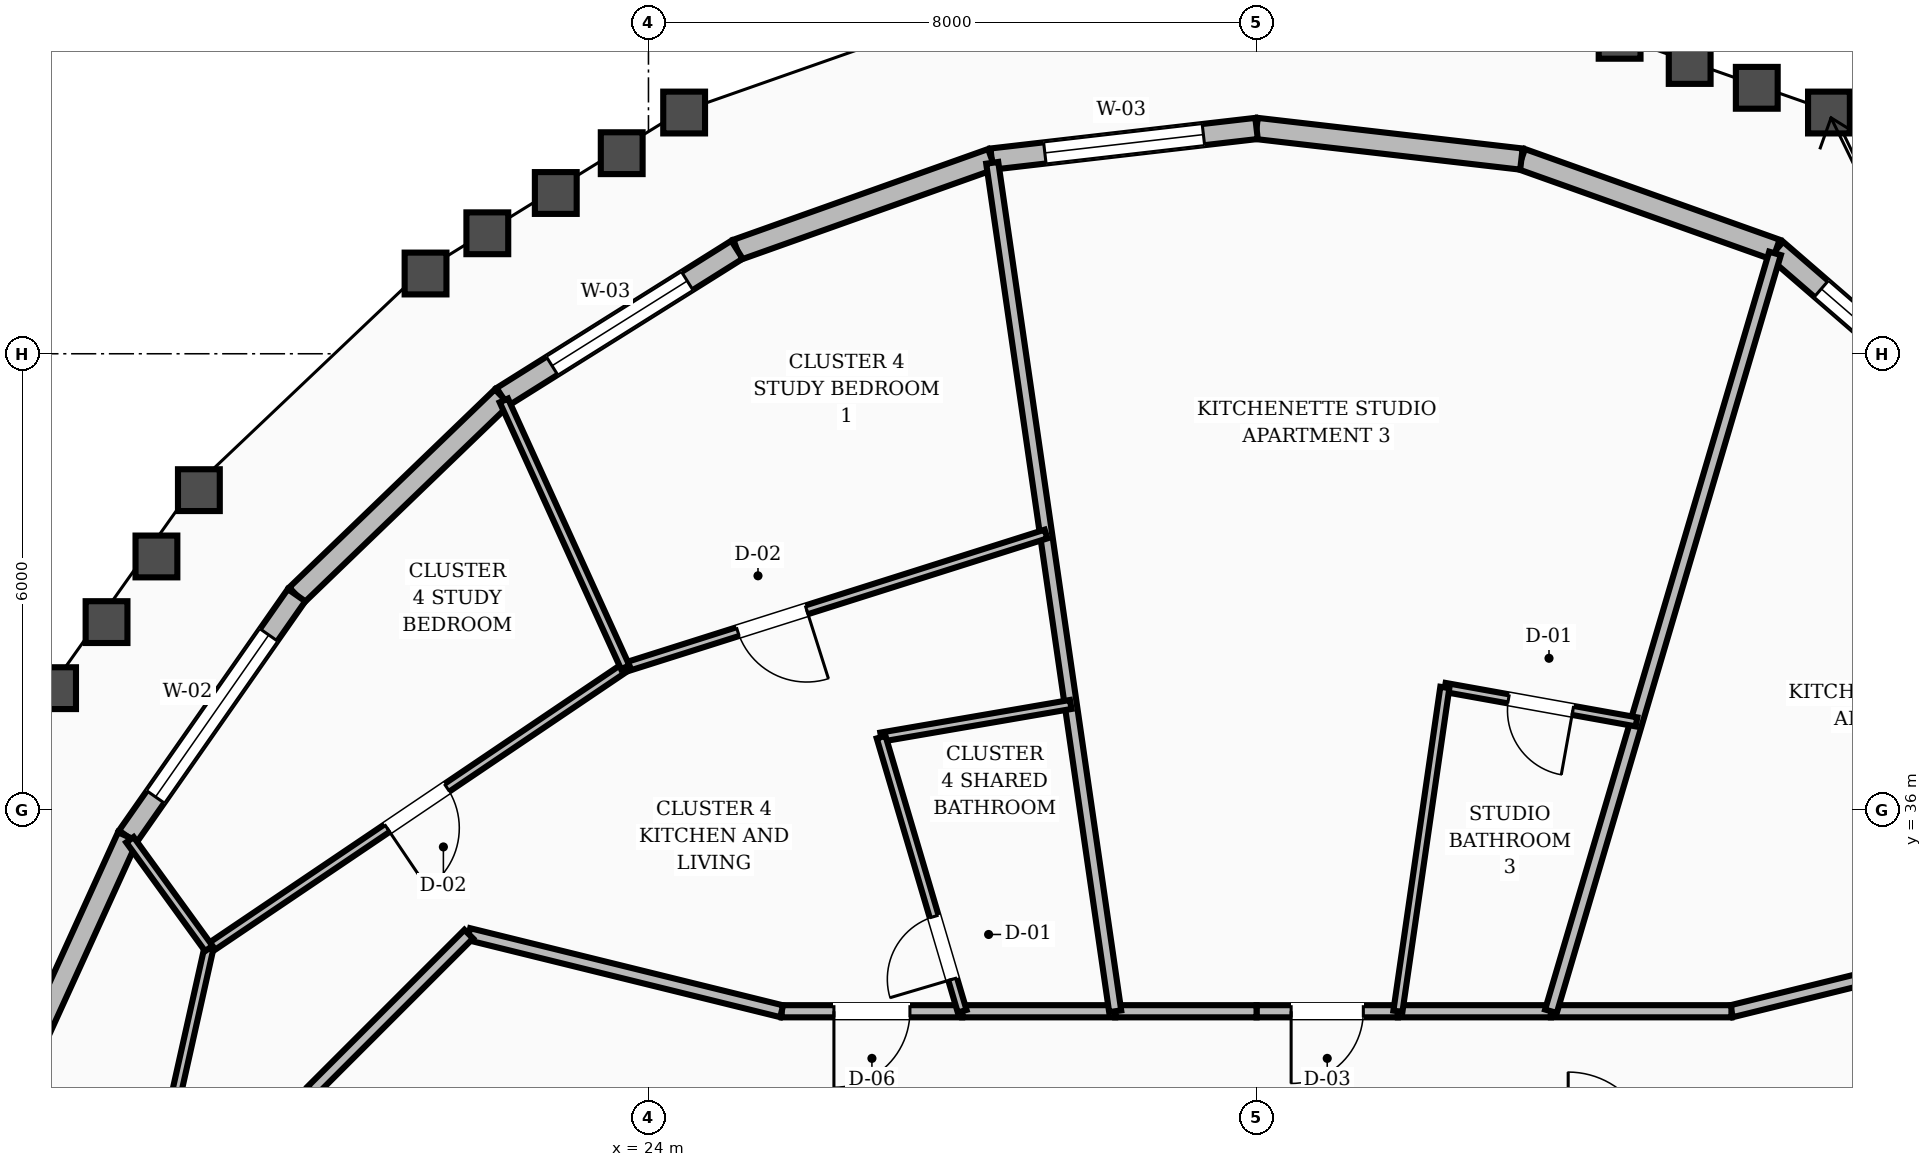
"""IFC4 building model, lengths in metres.
Left out: names, types, materials, properties, quantities, classifications, styles, units other than length and angle.
Written with IfcOpenShell. Run it as: python <this file> out.ifc"""

import sys

from ifc_helpers import new_model, si_unit, direction, frame, frame_2d, origin, place, context, subcontext, project, spatial, rectangle, extrude, element, fill, save


model = new_model("IFC4")
c1 = context("Model", 3, precision=1e-05, world=origin(), true_north=direction((0.0, 1.0)))
c2 = subcontext(c1, "Body", "Model", "MODEL_VIEW")
j1 = project(units=[si_unit("LENGTHUNIT", "METRE"), si_unit("PLANEANGLEUNIT", "RADIAN")], contexts=[c1])
p1 = place(None, origin())
s1 = spatial("IfcSite", under=j1, at=p1, CompositionType="ELEMENT")
p2 = place(p1, origin())
s2 = spatial("IfcBuilding", under=s1, at=p2, CompositionType="ELEMENT")
p3 = place(p2, frame((0.0, 0.0, 290.4)))
s3 = spatial("IfcBuildingStorey", under=s2, at=p3, CompositionType="ELEMENT", Elevation=290.4)
p4 = place(p3, frame((41.682, 40.905, 0.0), z_axis=(0.0, 0.0, 1.0), x_axis=(-0.756185346013, 0.654357488286, 0.0)))
e1 = element("IfcWall", 1, at=p4, inside=s3, PredefinedType="STANDARD", context=c2, shape_type="SweptSolid", body=[
    extrude(rectangle(XDim=3.764, YDim=0.28, at=frame_2d((1.882, 0.0))), origin(), (0.0, 0.0, 1.0), 2.88),
])
p5 = place(p4, frame((0.878, 0.0, 0.8)))
e2 = element("IfcOpeningElement", 2, at=p5, cuts=e1, PredefinedType="OPENING", context=c2, shape_type="SweptSolid", body=[
    extrude(rectangle(XDim=2.1, YDim=1.65, at=frame_2d((1.05, 0.825))), frame((0.0, 0.15, 0.0), z_axis=(0.0, -1.0, 0.0), x_axis=(1.0, 0.0, 0.0)), (0.0, 0.0, 1.0), 0.3),
])
p6 = place(p3, frame((38.835, 43.368, 0.0), z_axis=(0.0, 0.0, 1.0), x_axis=(-0.94207690039, 0.335396949527, 0.0)))
e3 = element("IfcWall", 3, at=p6, inside=s3, PredefinedType="STANDARD", context=c2, shape_type="SweptSolid", body=[
    extrude(rectangle(XDim=3.557, YDim=0.28, at=frame_2d((1.778, 0.0))), origin(), (0.0, 0.0, 1.0), 2.88),
])
p7 = place(p3, frame((35.485, 44.561, 0.0), z_axis=(0.0, 0.0, 1.0), x_axis=(-0.993384223019, 0.114838083653, 0.0)))
e4 = element("IfcWall", 4, at=p7, inside=s3, PredefinedType="STANDARD", context=c2, shape_type="SweptSolid", body=[
    extrude(rectangle(XDim=3.508, YDim=0.28, at=frame_2d((1.754, 0.0))), origin(), (0.0, 0.0, 1.0), 2.88),
])
p8 = place(p3, frame((32.0, 44.964, 0.0), z_axis=(0.0, 0.0, 1.0), x_axis=(-0.993384223019, -0.114838083653, 0.0)))
e5 = element("IfcWall", 5, at=p8, inside=s3, PredefinedType="STANDARD", context=c2, shape_type="SweptSolid", body=[
    extrude(rectangle(XDim=3.508, YDim=0.28, at=frame_2d((1.754, 0.0))), origin(), (0.0, 0.0, 1.0), 2.88),
])
p9 = place(p8, frame((0.704, 0.0, 0.8)))
e6 = element("IfcOpeningElement", 6, at=p9, cuts=e5, PredefinedType="OPENING", context=c2, shape_type="SweptSolid", body=[
    extrude(rectangle(XDim=2.1, YDim=1.65, at=frame_2d((1.05, 0.825))), frame((0.0, 0.15, 0.0), z_axis=(0.0, -1.0, 0.0), x_axis=(1.0, 0.0, 0.0)), (0.0, 0.0, 1.0), 0.3),
])
p10 = place(p3, frame((28.515, 44.561, 0.0), z_axis=(0.0, 0.0, 1.0), x_axis=(-0.94207690039, -0.335396949527, 0.0)))
e7 = element("IfcWall", 7, at=p10, inside=s3, PredefinedType="STANDARD", context=c2, shape_type="SweptSolid", body=[
    extrude(rectangle(XDim=3.557, YDim=0.28, at=frame_2d((1.778, 0.0))), origin(), (0.0, 0.0, 1.0), 2.88),
])
p11 = place(p3, frame((25.165, 43.368, 0.0), z_axis=(0.0, 0.0, 1.0), x_axis=(-0.847094045547, -0.531443014818, 0.0)))
e8 = element("IfcWall", 8, at=p11, inside=s3, PredefinedType="STANDARD", context=c2, shape_type="SweptSolid", body=[
    extrude(rectangle(XDim=3.645, YDim=0.28, at=frame_2d((1.823, 0.0))), origin(), (0.0, 0.0, 1.0), 2.88),
])
p12 = place(p11, frame((0.773, 0.0, 0.8)))
e9 = element("IfcOpeningElement", 9, at=p12, cuts=e8, PredefinedType="OPENING", context=c2, shape_type="SweptSolid", body=[
    extrude(rectangle(XDim=2.1, YDim=1.65, at=frame_2d((1.05, 0.825))), frame((0.0, 0.15, 0.0), z_axis=(0.0, -1.0, 0.0), x_axis=(1.0, 0.0, 0.0)), (0.0, 0.0, 1.0), 0.3),
])
p13 = place(p3, frame((22.077, 41.431, 0.0), z_axis=(0.0, 0.0, 1.0), x_axis=(-0.720234855693, -0.693730316943, 0.0)))
e10 = element("IfcWall", 10, at=p13, inside=s3, PredefinedType="STANDARD", context=c2, shape_type="SweptSolid", body=[
    extrude(rectangle(XDim=3.758, YDim=0.28, at=frame_2d((1.879, 0.0))), origin(), (0.0, 0.0, 1.0), 2.88),
])
p14 = place(p3, frame((19.37, 38.824, 0.0), z_axis=(0.0, 0.0, 1.0), x_axis=(-0.573022646369, -0.819539533365, 0.0)))
e11 = element("IfcWall", 11, at=p14, inside=s3, PredefinedType="STANDARD", context=c2, shape_type="SweptSolid", body=[
    extrude(rectangle(XDim=3.876, YDim=0.28, at=frame_2d((1.938, 0.0))), origin(), (0.0, 0.0, 1.0), 2.88),
])
p15 = place(p14, frame((0.638, 0.0, 0.8)))
e12 = element("IfcOpeningElement", 12, at=p15, cuts=e11, PredefinedType="OPENING", context=c2, shape_type="SweptSolid", body=[
    extrude(rectangle(XDim=2.6, YDim=1.65, at=frame_2d((1.3, 0.825))), frame((0.0, 0.15, 0.0), z_axis=(0.0, -1.0, 0.0), x_axis=(1.0, 0.0, 0.0)), (0.0, 0.0, 1.0), 0.3),
])
p16 = place(p3, frame((17.149, 35.647, 0.0), z_axis=(0.0, 0.0, 1.0), x_axis=(-0.414454053433, -0.910070237725, 0.0)))
e13 = element("IfcWall", 13, at=p16, inside=s3, PredefinedType="STANDARD", context=c2, shape_type="SweptSolid", body=[
    extrude(rectangle(XDim=3.983, YDim=0.28, at=frame_2d((1.991, 0.0))), origin(), (0.0, 0.0, 1.0), 2.88),
])
p17 = place(p3, frame((42.365, 34.365, 0.0), z_axis=(0.0, 0.0, 1.0), x_axis=(-0.970939799552, -0.239323850978, 0.0)))
e14 = element("IfcWall", 14, at=p17, inside=s3, PredefinedType="SOLIDWALL", context=c2, shape_type="SweptSolid", body=[
    extrude(rectangle(XDim=4.241, YDim=0.16, at=frame_2d((2.12, 0.0))), origin(), (0.0, 0.0, 1.0), 2.87),
])
p18 = place(p3, frame((38.248, 33.35, 0.0), z_axis=(0.0, 0.0, 1.0), x_axis=(-1.0, 0.0, 0.0)))
e15 = element("IfcWall", 15, at=p18, inside=s3, PredefinedType="SOLIDWALL", context=c2, shape_type="SweptSolid", body=[
    extrude(rectangle(XDim=2.375, YDim=0.16, at=frame_2d((1.188, 0.0))), origin(), (0.0, 0.0, 1.0), 2.87),
])
p19 = place(p3, frame((35.873, 33.35, 0.0), z_axis=(0.0, 0.0, 1.0), x_axis=(-1.0, 0.0, 0.0)))
e16 = element("IfcWall", 16, at=p19, inside=s3, PredefinedType="SOLIDWALL", context=c2, shape_type="SweptSolid", body=[
    extrude(rectangle(XDim=2.013, YDim=0.16, at=frame_2d((1.006, 0.0))), origin(), (0.0, 0.0, 1.0), 2.87),
])
p20 = place(p3, frame((33.86, 33.35, 0.0), z_axis=(0.0, 0.0, 1.0), x_axis=(-1.0, 0.0, 0.0)))
e17 = element("IfcWall", 17, at=p20, inside=s3, PredefinedType="SOLIDWALL", context=c2, shape_type="SweptSolid", body=[
    extrude(rectangle(XDim=1.86, YDim=0.16, at=frame_2d((0.93, 0.0))), origin(), (0.0, 0.0, 1.0), 2.87),
])
p21 = place(p20, frame((0.455, 0.0, 0.0)))
e18 = element("IfcOpeningElement", 18, at=p21, cuts=e17, PredefinedType="OPENING", context=c2, shape_type="SweptSolid", body=[
    extrude(rectangle(XDim=0.95, YDim=2.1, at=frame_2d((0.475, 1.05))), frame((0.0, 0.09, 0.0), z_axis=(0.0, -1.0, 0.0), x_axis=(1.0, 0.0, 0.0)), (0.0, 0.0, 1.0), 0.18),
])
p22 = place(p3, frame((32.0, 33.35, 0.0), z_axis=(0.0, 0.0, 1.0), x_axis=(-1.0, 0.0, 0.0)))
e19 = element("IfcWall", 19, at=p22, inside=s3, PredefinedType="SOLIDWALL", context=c2, shape_type="SweptSolid", body=[
    extrude(rectangle(XDim=1.86, YDim=0.16, at=frame_2d((0.93, 0.0))), origin(), (0.0, 0.0, 1.0), 2.87),
])
p23 = place(p3, frame((30.14, 33.35, 0.0), z_axis=(0.0, 0.0, 1.0), x_axis=(-1.0, 0.0, 0.0)))
e20 = element("IfcWall", 20, at=p23, inside=s3, PredefinedType="SOLIDWALL", context=c2, shape_type="SweptSolid", body=[
    extrude(rectangle(XDim=2.013, YDim=0.16, at=frame_2d((1.006, 0.0))), origin(), (0.0, 0.0, 1.0), 2.87),
])
p24 = place(p3, frame((28.127, 33.35, 0.0), z_axis=(0.0, 0.0, 1.0), x_axis=(-1.0, 0.0, 0.0)))
e21 = element("IfcWall", 21, at=p24, inside=s3, PredefinedType="SOLIDWALL", context=c2, shape_type="SweptSolid", body=[
    extrude(rectangle(XDim=2.375, YDim=0.16, at=frame_2d((1.188, 0.0))), origin(), (0.0, 0.0, 1.0), 2.87),
])
p25 = place(p24, frame((0.687, 0.0, 0.0)))
e22 = element("IfcOpeningElement", 22, at=p25, cuts=e21, PredefinedType="OPENING", context=c2, shape_type="SweptSolid", body=[
    extrude(rectangle(XDim=1.0, YDim=2.1, at=frame_2d((0.5, 1.05))), frame((0.0, 0.09, 0.0), z_axis=(0.0, -1.0, 0.0), x_axis=(1.0, 0.0, 0.0)), (0.0, 0.0, 1.0), 0.18),
])
p26 = place(p3, frame((25.752, 33.35, 0.0), z_axis=(0.0, 0.0, 1.0), x_axis=(-0.970939799552, 0.239323850978, 0.0)))
e23 = element("IfcWall", 23, at=p26, inside=s3, PredefinedType="SOLIDWALL", context=c2, shape_type="SweptSolid", body=[
    extrude(rectangle(XDim=4.241, YDim=0.16, at=frame_2d((2.12, 0.0))), origin(), (0.0, 0.0, 1.0), 2.87),
])
p27 = place(p3, frame((21.635, 34.365, 0.0), z_axis=(0.0, 0.0, 1.0), x_axis=(-0.707106781187, -0.707106781187, 0.0)))
e24 = element("IfcWall", 24, at=p27, inside=s3, PredefinedType="SOLIDWALL", context=c2, shape_type="SweptSolid", body=[
    extrude(rectangle(XDim=2.916, YDim=0.16, at=frame_2d((1.458, 0.0))), origin(), (0.0, 0.0, 1.0), 2.87),
])
p28 = place(p3, frame((35.873, 33.35, 0.0), z_axis=(0.0, 0.0, 1.0), x_axis=(0.283560622835, 0.958954312351, 0.0)))
e25 = element("IfcWall", 25, at=p28, inside=s3, PredefinedType="SOLIDWALL", context=c2, shape_type="SweptSolid", body=[
    extrude(rectangle(XDim=10.397, YDim=0.16, at=frame_2d((5.199, 0.0))), origin(), (0.0, 0.0, 1.0), 2.87),
])
p29 = place(p3, frame((36.999, 37.157, 0.0), z_axis=(0.0, 0.0, 1.0), x_axis=(-0.984214215715, 0.176981291622, 0.0)))
e26 = element("IfcWall", 26, at=p29, inside=s3, PredefinedType="PARTITIONING", context=c2, shape_type="SweptSolid", body=[
    extrude(rectangle(XDim=2.562, YDim=0.12, at=frame_2d((1.281, 0.0))), origin(), (0.0, 0.0, 1.0), 2.87),
])
p30 = place(p29, frame((0.851, 0.0, 0.0)))
e27 = element("IfcOpeningElement", 27, at=p30, cuts=e26, PredefinedType="OPENING", context=c2, shape_type="SweptSolid", body=[
    extrude(rectangle(XDim=0.86, YDim=2.1, at=frame_2d((0.43, 1.05))), frame((0.0, 0.07, 0.0), z_axis=(0.0, -1.0, 0.0), x_axis=(1.0, 0.0, 0.0)), (0.0, 0.0, 1.0), 0.14),
])
p31 = place(p3, frame((33.86, 33.35, 0.0), z_axis=(0.0, 0.0, 1.0), x_axis=(0.143429877353, 0.989660482328, 0.0)))
e28 = element("IfcWall", 28, at=p31, inside=s3, PredefinedType="PARTITIONING", context=c2, shape_type="SweptSolid", body=[
    extrude(rectangle(XDim=4.305, YDim=0.12, at=frame_2d((2.152, 0.0))), origin(), (0.0, 0.0, 1.0), 2.87),
])
p32 = place(p3, frame((30.14, 33.35, 0.0), z_axis=(0.0, 0.0, 1.0), x_axis=(-0.143409100009, 0.989663493332, 0.0)))
e29 = element("IfcWall", 29, at=p32, inside=s3, PredefinedType="SOLIDWALL", context=c2, shape_type="SweptSolid", body=[
    extrude(rectangle(XDim=11.279, YDim=0.16, at=frame_2d((5.639, 0.0))), origin(), (0.0, 0.0, 1.0), 2.87),
])
p33 = place(p3, frame((29.555, 37.386, 0.0), z_axis=(0.0, 0.0, 1.0), x_axis=(-0.985504074512, -0.169651758374, 0.0)))
e30 = element("IfcWall", 30, at=p33, inside=s3, PredefinedType="PARTITIONING", context=c2, shape_type="SweptSolid", body=[
    extrude(rectangle(XDim=2.531, YDim=0.12, at=frame_2d((1.266, 0.0))), origin(), (0.0, 0.0, 1.0), 2.87),
])
p34 = place(p3, frame((28.127, 33.35, 0.0), z_axis=(0.0, 0.0, 1.0), x_axis=(-0.283557816231, 0.958955142253, 0.0)))
e31 = element("IfcWall", 31, at=p34, inside=s3, PredefinedType="PARTITIONING", context=c2, shape_type="SweptSolid", body=[
    extrude(rectangle(XDim=3.761, YDim=0.12, at=frame_2d((1.88, 0.0))), origin(), (0.0, 0.0, 1.0), 2.87),
])
p35 = place(p34, frame((0.44, 0.0, 0.0)))
e32 = element("IfcOpeningElement", 32, at=p35, cuts=e31, PredefinedType="OPENING", context=c2, shape_type="SweptSolid", body=[
    extrude(rectangle(XDim=0.86, YDim=2.1, at=frame_2d((0.43, 1.05))), frame((0.0, 0.07, 0.0), z_axis=(0.0, -1.0, 0.0), x_axis=(1.0, 0.0, 0.0)), (0.0, 0.0, 1.0), 0.14),
])
p36 = place(p3, frame((29.23, 39.628, 0.0), z_axis=(0.0, 0.0, 1.0), x_axis=(-0.953351098294, -0.301863683443, 0.0)))
e33 = element("IfcWall", 33, at=p36, inside=s3, PredefinedType="PARTITIONING", context=c2, shape_type="SweptSolid", body=[
    extrude(rectangle(XDim=5.807, YDim=0.12, at=frame_2d((2.904, 0.0))), origin(), (0.0, 0.0, 1.0), 2.87),
])
p37 = place(p36, frame((3.303, 0.0, 0.0)))
e34 = element("IfcOpeningElement", 34, at=p37, cuts=e33, PredefinedType="OPENING", context=c2, shape_type="SweptSolid", body=[
    extrude(rectangle(XDim=0.95, YDim=2.1, at=frame_2d((0.475, 1.05))), frame((0.0, 0.07, 0.0), z_axis=(0.0, -1.0, 0.0), x_axis=(1.0, 0.0, 0.0)), (0.0, 0.0, 1.0), 0.14),
])
p38 = place(p3, frame((23.694, 37.875, 0.0), z_axis=(0.0, 0.0, 1.0), x_axis=(-0.82872877639, -0.55965044017, 0.0)))
e35 = element("IfcWall", 35, at=p38, inside=s3, PredefinedType="PARTITIONING", context=c2, shape_type="SweptSolid", body=[
    extrude(rectangle(XDim=6.611, YDim=0.12, at=frame_2d((3.305, 0.0))), origin(), (0.0, 0.0, 1.0), 2.87),
])
p39 = place(p38, frame((2.83, 0.0, 0.0)))
e36 = element("IfcOpeningElement", 36, at=p39, cuts=e35, PredefinedType="OPENING", context=c2, shape_type="SweptSolid", body=[
    extrude(rectangle(XDim=0.95, YDim=2.1, at=frame_2d((0.475, 1.05))), frame((0.0, 0.07, 0.0), z_axis=(0.0, -1.0, 0.0), x_axis=(1.0, 0.0, 0.0)), (0.0, 0.0, 1.0), 0.14),
])
p40 = place(p3, frame((23.694, 37.875, 0.0), z_axis=(0.0, 0.0, 1.0), x_axis=(-0.414065284682, 0.91024718622, 0.0)))
e37 = element("IfcWall", 37, at=p40, inside=s3, PredefinedType="PARTITIONING", context=c2, shape_type="SweptSolid", body=[
    extrude(rectangle(XDim=3.856, YDim=0.12, at=frame_2d((1.928, 0.0))), origin(), (0.0, 0.0, 1.0), 2.87),
])
p41 = place(p3, frame((18.216, 34.176, 0.0), z_axis=(0.0, 0.0, 1.0), x_axis=(-0.217921941181, -0.975966202054, 0.0)))
e38 = element("IfcWall", 38, at=p41, inside=s3, PredefinedType="PARTITIONING", context=c2, shape_type="SweptSolid", body=[
    extrude(rectangle(XDim=6.96, YDim=0.12, at=frame_2d((3.48, 0.0))), origin(), (0.0, 0.0, 1.0), 2.87),
])
p42 = place(p41, frame((3.005, 0.0, 0.0)))
e39 = element("IfcOpeningElement", 39, at=p42, cuts=e38, PredefinedType="OPENING", context=c2, shape_type="SweptSolid", body=[
    extrude(rectangle(XDim=0.95, YDim=2.1, at=frame_2d((0.475, 1.05))), frame((0.0, 0.07, 0.0), z_axis=(0.0, -1.0, 0.0), x_axis=(1.0, 0.0, 0.0)), (0.0, 0.0, 1.0), 0.14),
])
p43 = place(p3, frame((18.216, 34.176, 0.0), z_axis=(0.0, 0.0, 1.0), x_axis=(-0.586947198649, 0.809625213292, 0.0)))
e40 = element("IfcWall", 40, at=p43, inside=s3, PredefinedType="PARTITIONING", context=c2, shape_type="SweptSolid", body=[
    extrude(rectangle(XDim=1.767, YDim=0.12, at=frame_2d((0.884, 0.0))), origin(), (0.0, 0.0, 1.0), 2.87),
])
p44 = place(p5, origin())
e41 = element("IfcWindow", 41, at=p44, inside=s3, PartitioningType="SINGLE_PANEL", PredefinedType="WINDOW", context=c2, shape_type="SweptSolid", body=[
    extrude(rectangle(XDim=2.1, YDim=1.65, at=frame_2d((1.05, 0.825))), frame((0.0, 0.03, 0.0), z_axis=(0.0, -1.0, 0.0), x_axis=(1.0, 0.0, 0.0)), (0.0, 0.0, 1.0), 0.06),
])
fill(e2, e41)
p45 = place(p9, origin())
e42 = element("IfcWindow", 42, at=p45, inside=s3, PartitioningType="SINGLE_PANEL", PredefinedType="WINDOW", context=c2, shape_type="SweptSolid", body=[
    extrude(rectangle(XDim=2.1, YDim=1.65, at=frame_2d((1.05, 0.825))), frame((0.0, 0.03, 0.0), z_axis=(0.0, -1.0, 0.0), x_axis=(1.0, 0.0, 0.0)), (0.0, 0.0, 1.0), 0.06),
])
fill(e6, e42)
p46 = place(p12, origin())
e43 = element("IfcWindow", 43, at=p46, inside=s3, PartitioningType="SINGLE_PANEL", PredefinedType="WINDOW", context=c2, shape_type="SweptSolid", body=[
    extrude(rectangle(XDim=2.1, YDim=1.65, at=frame_2d((1.05, 0.825))), frame((0.0, 0.03, 0.0), z_axis=(0.0, -1.0, 0.0), x_axis=(1.0, 0.0, 0.0)), (0.0, 0.0, 1.0), 0.06),
])
fill(e9, e43)
p47 = place(p15, origin())
e44 = element("IfcWindow", 44, at=p47, inside=s3, PartitioningType="SINGLE_PANEL", PredefinedType="WINDOW", context=c2, shape_type="SweptSolid", body=[
    extrude(rectangle(XDim=2.6, YDim=1.65, at=frame_2d((1.3, 0.825))), frame((0.0, 0.03, 0.0), z_axis=(0.0, -1.0, 0.0), x_axis=(1.0, 0.0, 0.0)), (0.0, 0.0, 1.0), 0.06),
])
fill(e12, e44)
p48 = place(p30, origin())
e45 = element("IfcDoor", 45, at=p48, inside=s3, OperationType="SINGLE_SWING_LEFT", PredefinedType="DOOR", context=c2, shape_type="SweptSolid", body=[
    extrude(rectangle(XDim=0.86, YDim=2.1, at=frame_2d((0.43, 1.05))), frame((0.0, 0.025, 0.0), z_axis=(0.0, -1.0, 0.0), x_axis=(1.0, 0.0, 0.0)), (0.0, 0.0, 1.0), 0.05),
])
fill(e27, e45)
p49 = place(p21, origin())
e46 = element("IfcDoor", 46, at=p49, inside=s3, OperationType="SINGLE_SWING_RIGHT", PredefinedType="DOOR", context=c2, shape_type="SweptSolid", body=[
    extrude(rectangle(XDim=0.95, YDim=2.1, at=frame_2d((0.475, 1.05))), frame((0.0, 0.025, 0.0), z_axis=(0.0, -1.0, 0.0), x_axis=(1.0, 0.0, 0.0)), (0.0, 0.0, 1.0), 0.05),
])
fill(e18, e46)
p50 = place(p35, origin())
e47 = element("IfcDoor", 47, at=p50, inside=s3, OperationType="SINGLE_SWING_LEFT", PredefinedType="DOOR", context=c2, shape_type="SweptSolid", body=[
    extrude(rectangle(XDim=0.86, YDim=2.1, at=frame_2d((0.43, 1.05))), frame((0.0, 0.025, 0.0), z_axis=(0.0, -1.0, 0.0), x_axis=(1.0, 0.0, 0.0)), (0.0, 0.0, 1.0), 0.05),
])
fill(e32, e47)
p51 = place(p25, origin())
e48 = element("IfcDoor", 48, at=p51, inside=s3, OperationType="SINGLE_SWING_RIGHT", PredefinedType="DOOR", context=c2, shape_type="SweptSolid", body=[
    extrude(rectangle(XDim=1.0, YDim=2.1, at=frame_2d((0.5, 1.05))), frame((0.0, 0.025, 0.0), z_axis=(0.0, -1.0, 0.0), x_axis=(1.0, 0.0, 0.0)), (0.0, 0.0, 1.0), 0.05),
])
fill(e22, e48)
p52 = place(p37, origin())
e49 = element("IfcDoor", 49, at=p52, inside=s3, OperationType="SINGLE_SWING_LEFT", PredefinedType="DOOR", context=c2, shape_type="SweptSolid", body=[
    extrude(rectangle(XDim=0.95, YDim=2.1, at=frame_2d((0.475, 1.05))), frame((0.0, 0.025, 0.0), z_axis=(0.0, -1.0, 0.0), x_axis=(1.0, 0.0, 0.0)), (0.0, 0.0, 1.0), 0.05),
])
fill(e34, e49)
p53 = place(p39, origin())
e50 = element("IfcDoor", 50, at=p53, inside=s3, OperationType="SINGLE_SWING_RIGHT", PredefinedType="DOOR", context=c2, shape_type="SweptSolid", body=[
    extrude(rectangle(XDim=0.95, YDim=2.1, at=frame_2d((0.475, 1.05))), frame((0.0, 0.025, 0.0), z_axis=(0.0, -1.0, 0.0), x_axis=(1.0, 0.0, 0.0)), (0.0, 0.0, 1.0), 0.05),
])
fill(e36, e50)
save(model, sys.argv[1])
